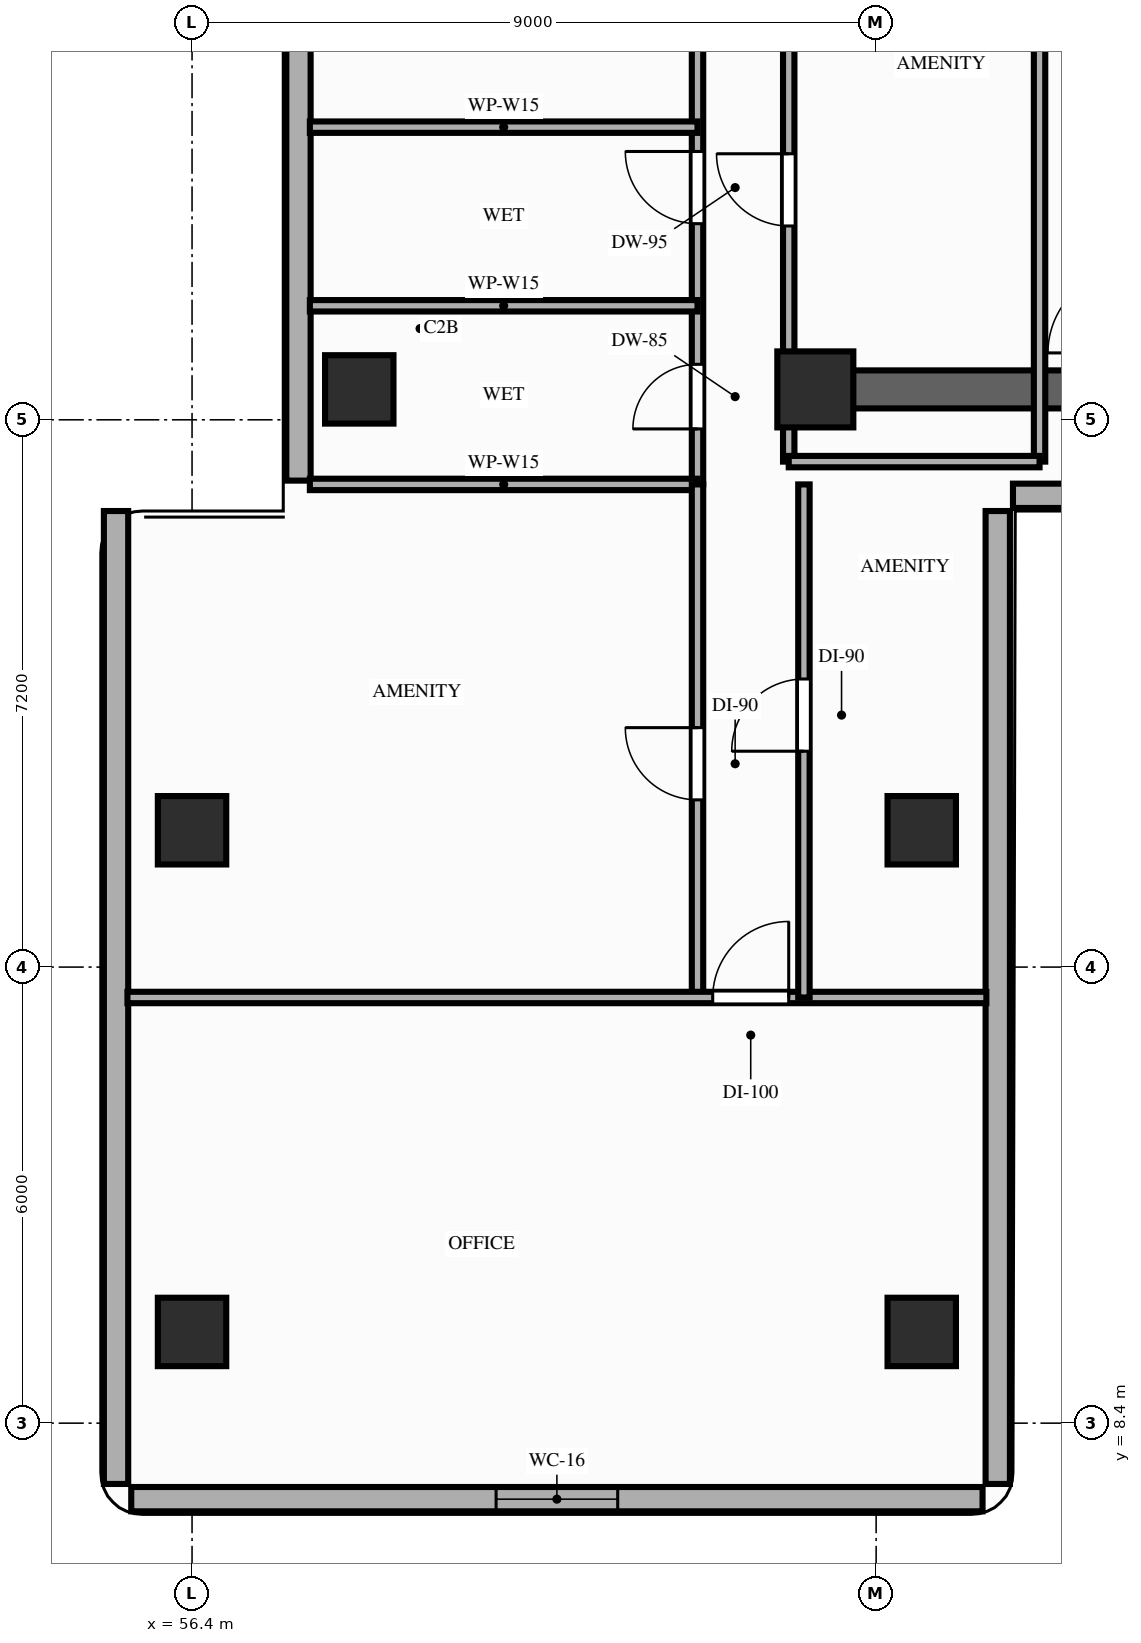
"""IFC4 building model, lengths in metres.
Left out: names, types, materials, properties, quantities, classifications, styles, units other than length and angle.
Written with IfcOpenShell. Run it as: python <this file> out.ifc"""

import sys

from ifc_helpers import new_model, si_unit, direction, frame, frame_2d, origin, origin_2d, place, context, subcontext, project, spatial, rectangle, extrude, element, fill, save


model = new_model("IFC4")
c1 = context("Model", 3, precision=1e-05, world=origin(), true_north=direction((0.0, 1.0)))
c2 = subcontext(c1, "Body", "Model", "MODEL_VIEW")
j1 = project(units=[si_unit("LENGTHUNIT", "METRE"), si_unit("PLANEANGLEUNIT", "RADIAN")], contexts=[c1])
p1 = place(None, origin())
s1 = spatial("IfcSite", under=j1, at=p1, CompositionType="ELEMENT")
p2 = place(p1, origin())
s2 = spatial("IfcBuilding", under=s1, at=p2, CompositionType="ELEMENT")
p3 = place(p2, frame((0.0, 0.0, 62.8)))
s3 = spatial("IfcBuildingStorey", under=s2, at=p3, CompositionType="ELEMENT", Elevation=62.8)
p4 = place(p3, frame((64.6, 22.0, 0.0), z_axis=(0.0, 0.0, 1.0), x_axis=(1.0, 0.0, 0.0)))
e1 = element("IfcColumn", 1, at=p4, inside=s3, PredefinedType="COLUMN", context=c2, shape_type="SweptSolid", body=[
    extrude(rectangle(XDim=1.0, YDim=1.0, at=origin_2d()), origin(), (0.0, 0.0, 1.0), 3.2),
])
for number, where, z_axis, x_axis in (
    (2, (58.6, 22.0, 0.0), (0.0, 0.0, 1.0), (1.0, 0.0, 0.0)),
    (3, (56.4, 9.6, 0.0), (0.0, 0.0, 1.0), (1.0, 0.0, 0.0)),
    (4, (56.4, 16.2, 0.0), (0.0, 0.0, 1.0), (1.0, 0.0, 0.0)),
    (5, (66.0, 9.6, 0.0), (0.0, 0.0, 1.0), (1.0, 0.0, 0.0)),
    (6, (66.0, 16.2, 0.0), (0.0, 0.0, 1.0), (1.0, 0.0, 0.0)),
):
    element("IfcColumn", number, at=place(p3, frame(where, z_axis=z_axis, x_axis=x_axis)), inside=s3, PredefinedType="COLUMN", context=c2, shape_type="SweptSolid", body=[
        extrude(rectangle(XDim=0.9, YDim=0.9, at=origin_2d()), origin(), (0.0, 0.0, 1.0), 3.2),
    ])
p5 = place(p3, frame((57.8, 43.4, 0.0), z_axis=(0.0, 0.0, 1.0), x_axis=(0.0, -1.0, 0.0)))
e7 = element("IfcWall", 7, at=p5, inside=s3, PredefinedType="STANDARD", context=c2, shape_type="SweptSolid", body=[
    extrude(rectangle(XDim=22.6, YDim=0.32, at=frame_2d((11.3, 0.0))), origin(), (0.0, 0.0, 1.0), 2.5),
])
p6 = place(p5, frame((3.6, 0.0, 0.85)))
e8 = element("IfcOpeningElement", 8, at=p6, cuts=e7, PredefinedType="OPENING", context=c2, shape_type="SweptSolid", body=[
    extrude(rectangle(XDim=1.6, YDim=1.35, at=frame_2d((0.8, 0.675))), frame((0.0, 0.17, 0.0), z_axis=(0.0, -1.0, 0.0), x_axis=(1.0, 0.0, 0.0)), (0.0, 0.0, 1.0), 0.34),
])
p7 = place(p3, frame((55.6, 7.4, 0.0), z_axis=(0.0, 0.0, 1.0), x_axis=(1.0, 0.0, 0.0)))
e9 = element("IfcWall", 9, at=p7, inside=s3, PredefinedType="STANDARD", context=c2, shape_type="SweptSolid", body=[
    extrude(rectangle(XDim=11.2, YDim=0.32, at=frame_2d((5.6, 0.0))), origin(), (0.0, 0.0, 1.0), 3.02),
])
p8 = place(p7, frame((4.8, 0.0, 0.85)))
e10 = element("IfcOpeningElement", 10, at=p8, cuts=e9, PredefinedType="OPENING", context=c2, shape_type="SweptSolid", body=[
    extrude(rectangle(XDim=1.6, YDim=1.7, at=frame_2d((0.8, 0.85))), frame((0.0, 0.17, 0.0), z_axis=(0.0, -1.0, 0.0), x_axis=(1.0, 0.0, 0.0)), (0.0, 0.0, 1.0), 0.34),
])
for number, where, z_axis, x_axis in (
    (11, (55.4, 20.4, 0.0), (0.0, 0.0, 1.0), (0.0, -1.0, 0.0)),
    (12, (67.0, 7.6, 0.0), (0.0, 0.0, 1.0), (0.0, 1.0, 0.0)),
):
    element("IfcWall", number, at=place(p3, frame(where, z_axis=z_axis, x_axis=x_axis)), inside=s3, PredefinedType="STANDARD", context=c2, shape_type="SweptSolid", body=[
        extrude(rectangle(XDim=12.8, YDim=0.32, at=frame_2d((6.4, 0.0))), origin(), (0.0, 0.0, 1.0), 3.02),
    ])
p9 = place(p3, frame((67.2, 20.6, 0.0), z_axis=(0.0, 0.0, 1.0), x_axis=(1.0, 0.0, 0.0)))
e13 = element("IfcWall", 13, at=p9, inside=s3, PredefinedType="STANDARD", context=c2, shape_type="SweptSolid", body=[
    extrude(rectangle(XDim=5.6, YDim=0.32, at=frame_2d((2.8, 0.0))), origin(), (0.0, 0.0, 1.0), 3.02),
])
p10 = place(p3, frame((64.6, 22.0, 0.0), z_axis=(0.0, 0.0, 1.0), x_axis=(1.0, 0.0, 0.0)))
e14 = element("IfcWall", 14, at=p10, inside=s3, PredefinedType="SHEAR", context=c2, shape_type="SweptSolid", body=[
    extrude(rectangle(XDim=7.5, YDim=0.5, at=frame_2d((3.75, 0.0))), origin(), (0.0, 0.0, 1.0), 3.02),
])
p11 = place(p3, frame((64.25, 21.05, 0.0), z_axis=(0.0, 0.0, 1.0), x_axis=(0.0, 1.0, 0.0)))
e15 = element("IfcWall", 15, at=p11, inside=s3, PredefinedType="PARTITIONING", context=c2, shape_type="SweptSolid", body=[
    extrude(rectangle(XDim=6.55, YDim=0.15, at=frame_2d((3.275, 0.0))), origin(), (0.0, 0.0, 1.0), 2.5),
])
p12 = place(p11, frame((3.1, 0.0, 0.0)))
e16 = element("IfcOpeningElement", 16, at=p12, cuts=e15, PredefinedType="OPENING", context=c2, shape_type="SweptSolid", body=[
    extrude(rectangle(XDim=0.95, YDim=2.15, at=frame_2d((0.475, 1.075))), frame((0.0, 0.085, 0.0), z_axis=(0.0, -1.0, 0.0), x_axis=(1.0, 0.0, 0.0)), (0.0, 0.0, 1.0), 0.17),
])
p13 = place(p3, frame((67.55, 21.05, 0.0), z_axis=(0.0, 0.0, 1.0), x_axis=(0.0, 1.0, 0.0)))
e17 = element("IfcWall", 17, at=p13, inside=s3, PredefinedType="PARTITIONING", context=c2, shape_type="SweptSolid", body=[
    extrude(rectangle(XDim=6.47, YDim=0.15, at=frame_2d((3.235, 0.0))), origin(), (0.0, 0.0, 1.0), 2.5),
])
p14 = place(p3, frame((64.25, 21.05, 0.0), z_axis=(0.0, 0.0, 1.0), x_axis=(1.0, 0.0, 0.0)))
e18 = element("IfcWall", 18, at=p14, inside=s3, PredefinedType="PARTITIONING", context=c2, shape_type="SweptSolid", body=[
    extrude(rectangle(XDim=3.3, YDim=0.15, at=frame_2d((1.65, 0.0))), origin(), (0.0, 0.0, 1.0), 2.5),
])
p15 = place(p3, frame((63.05, 20.75, 0.0), z_axis=(0.0, 0.0, 1.0), x_axis=(0.0, 1.0, 0.0)))
e19 = element("IfcWall", 19, at=p15, inside=s3, PredefinedType="PARTITIONING", context=c2, shape_type="SweptSolid", body=[
    extrude(rectangle(XDim=22.7, YDim=0.15, at=frame_2d((11.35, 0.0))), origin(), (0.0, 0.0, 1.0), 2.5),
])
p16 = place(p15, frame((0.73, 0.0, 0.0)))
e20 = element("IfcOpeningElement", 20, at=p16, cuts=e19, PredefinedType="OPENING", context=c2, shape_type="SweptSolid", body=[
    extrude(rectangle(XDim=0.85, YDim=2.1, at=frame_2d((0.425, 1.05))), frame((0.0, 0.085, 0.0), z_axis=(0.0, -1.0, 0.0), x_axis=(1.0, 0.0, 0.0)), (0.0, 0.0, 1.0), 0.17),
])
p17 = place(p15, frame((3.43, 0.0, 0.0)))
e21 = element("IfcOpeningElement", 21, at=p17, cuts=e19, PredefinedType="OPENING", context=c2, shape_type="SweptSolid", body=[
    extrude(rectangle(XDim=0.95, YDim=2.1, at=frame_2d((0.475, 1.05))), frame((0.0, 0.085, 0.0), z_axis=(0.0, -1.0, 0.0), x_axis=(1.0, 0.0, 0.0)), (0.0, 0.0, 1.0), 0.17),
])
p18 = place(p15, frame((8.15, 0.0, 0.0)))
e22 = element("IfcOpeningElement", 22, at=p18, cuts=e19, PredefinedType="OPENING", context=c2, shape_type="SweptSolid", body=[
    extrude(rectangle(XDim=0.95, YDim=2.15, at=frame_2d((0.475, 1.075))), frame((0.0, 0.085, 0.0), z_axis=(0.0, -1.0, 0.0), x_axis=(1.0, 0.0, 0.0)), (0.0, 0.0, 1.0), 0.17),
])
for number, where, z_axis, x_axis in (
    (23, (57.95, 20.75, 0.0), (0.0, 0.0, 1.0), (1.0, 0.0, 0.0)),
    (24, (57.95, 23.1, 0.0), (0.0, 0.0, 1.0), (1.0, 0.0, 0.0)),
    (25, (57.95, 25.45, 0.0), (0.0, 0.0, 1.0), (1.0, 0.0, 0.0)),
):
    element("IfcWall", number, at=place(p3, frame(where, z_axis=z_axis, x_axis=x_axis)), inside=s3, PredefinedType="PARTITIONING", context=c2, shape_type="SweptSolid", body=[
        extrude(rectangle(XDim=5.1, YDim=0.15, at=frame_2d((2.55, 0.0))), origin(), (0.0, 0.0, 1.0), 2.5),
    ])
p19 = place(p3, frame((63.05, 14.0, 0.0), z_axis=(0.0, 0.0, 1.0), x_axis=(0.0, 1.0, 0.0)))
e26 = element("IfcWall", 26, at=p19, inside=s3, PredefinedType="PARTITIONING", context=c2, shape_type="SweptSolid", body=[
    extrude(rectangle(XDim=6.75, YDim=0.15, at=frame_2d((3.375, 0.0))), origin(), (0.0, 0.0, 1.0), 2.5),
])
p20 = place(p19, frame((2.6, 0.0, 0.0)))
e27 = element("IfcOpeningElement", 27, at=p20, cuts=e26, PredefinedType="OPENING", context=c2, shape_type="SweptSolid", body=[
    extrude(rectangle(XDim=0.95, YDim=2.15, at=frame_2d((0.475, 1.075))), frame((0.0, 0.085, 0.0), z_axis=(0.0, -1.0, 0.0), x_axis=(1.0, 0.0, 0.0)), (0.0, 0.0, 1.0), 0.17),
])
p21 = place(p3, frame((55.55, 14.0, 0.0), z_axis=(0.0, 0.0, 1.0), x_axis=(1.0, 0.0, 0.0)))
e28 = element("IfcWall", 28, at=p21, inside=s3, PredefinedType="PARTITIONING", context=c2, shape_type="SweptSolid", body=[
    extrude(rectangle(XDim=11.3, YDim=0.15, at=frame_2d((5.65, 0.0))), origin(), (0.0, 0.0, 1.0), 2.5),
])
p22 = place(p21, frame((7.7, 0.0, 0.0)))
e29 = element("IfcOpeningElement", 29, at=p22, cuts=e28, PredefinedType="OPENING", context=c2, shape_type="SweptSolid", body=[
    extrude(rectangle(XDim=1.0, YDim=2.15, at=frame_2d((0.5, 1.075))), frame((0.0, 0.085, 0.0), z_axis=(0.0, -1.0, 0.0), x_axis=(1.0, 0.0, 0.0)), (0.0, 0.0, 1.0), 0.17),
])
p23 = place(p3, frame((64.45, 14.0, 0.0), z_axis=(0.0, 0.0, 1.0), x_axis=(0.0, 1.0, 0.0)))
e30 = element("IfcWall", 30, at=p23, inside=s3, PredefinedType="PARTITIONING", context=c2, shape_type="SweptSolid", body=[
    extrude(rectangle(XDim=6.75, YDim=0.15, at=frame_2d((3.375, 0.0))), origin(), (0.0, 0.0, 1.0), 2.5),
])
p24 = place(p23, frame((3.24, 0.0, 0.0)))
e31 = element("IfcOpeningElement", 31, at=p24, cuts=e30, PredefinedType="OPENING", context=c2, shape_type="SweptSolid", body=[
    extrude(rectangle(XDim=0.95, YDim=2.15, at=frame_2d((0.475, 1.075))), frame((0.0, 0.085, 0.0), z_axis=(0.0, -1.0, 0.0), x_axis=(1.0, 0.0, 0.0)), (0.0, 0.0, 1.0), 0.17),
])
p25 = place(p8, origin())
e32 = element("IfcWindow", 32, at=p25, inside=s3, PartitioningType="SINGLE_PANEL", PredefinedType="WINDOW", context=c2, shape_type="SweptSolid", body=[
    extrude(rectangle(XDim=1.6, YDim=1.7, at=frame_2d((0.8, 0.85))), frame((0.0, 0.03, 0.0), z_axis=(0.0, -1.0, 0.0), x_axis=(1.0, 0.0, 0.0)), (0.0, 0.0, 1.0), 0.06),
])
fill(e10, e32)
p26 = place(p12, origin())
e33 = element("IfcDoor", 33, at=p26, inside=s3, OperationType="SINGLE_SWING_RIGHT", PredefinedType="DOOR", context=c2, shape_type="SweptSolid", body=[
    extrude(rectangle(XDim=0.95, YDim=2.15, at=frame_2d((0.475, 1.075))), frame((0.0, 0.025, 0.0), z_axis=(0.0, -1.0, 0.0), x_axis=(1.0, 0.0, 0.0)), (0.0, 0.0, 1.0), 0.05),
])
fill(e16, e33)
p27 = place(p16, origin())
e34 = element("IfcDoor", 34, at=p27, inside=s3, OperationType="SINGLE_SWING_LEFT", PredefinedType="DOOR", context=c2, shape_type="SweptSolid", body=[
    extrude(rectangle(XDim=0.85, YDim=2.1, at=frame_2d((0.425, 1.05))), frame((0.0, 0.025, 0.0), z_axis=(0.0, -1.0, 0.0), x_axis=(1.0, 0.0, 0.0)), (0.0, 0.0, 1.0), 0.05),
])
fill(e20, e34)
p28 = place(p17, origin())
e35 = element("IfcDoor", 35, at=p28, inside=s3, OperationType="SINGLE_SWING_RIGHT", PredefinedType="DOOR", context=c2, shape_type="SweptSolid", body=[
    extrude(rectangle(XDim=0.95, YDim=2.1, at=frame_2d((0.475, 1.05))), frame((0.0, 0.025, 0.0), z_axis=(0.0, -1.0, 0.0), x_axis=(1.0, 0.0, 0.0)), (0.0, 0.0, 1.0), 0.05),
])
fill(e21, e35)
p29 = place(p20, origin())
e36 = element("IfcDoor", 36, at=p29, inside=s3, OperationType="SINGLE_SWING_RIGHT", PredefinedType="DOOR", context=c2, shape_type="SweptSolid", body=[
    extrude(rectangle(XDim=0.95, YDim=2.15, at=frame_2d((0.475, 1.075))), frame((0.0, 0.025, 0.0), z_axis=(0.0, -1.0, 0.0), x_axis=(1.0, 0.0, 0.0)), (0.0, 0.0, 1.0), 0.05),
])
fill(e27, e36)
p30 = place(p24, origin())
e37 = element("IfcDoor", 37, at=p30, inside=s3, OperationType="SINGLE_SWING_LEFT", PredefinedType="DOOR", context=c2, shape_type="SweptSolid", body=[
    extrude(rectangle(XDim=0.95, YDim=2.15, at=frame_2d((0.475, 1.075))), frame((0.0, 0.025, 0.0), z_axis=(0.0, -1.0, 0.0), x_axis=(1.0, 0.0, 0.0)), (0.0, 0.0, 1.0), 0.05),
])
fill(e31, e37)
p31 = place(p22, origin())
e38 = element("IfcDoor", 38, at=p31, inside=s3, OperationType="SINGLE_SWING_RIGHT", PredefinedType="DOOR", context=c2, shape_type="SweptSolid", body=[
    extrude(rectangle(XDim=1.0, YDim=2.15, at=frame_2d((0.5, 1.075))), frame((0.0, 0.025, 0.0), z_axis=(0.0, -1.0, 0.0), x_axis=(1.0, 0.0, 0.0)), (0.0, 0.0, 1.0), 0.05),
])
fill(e29, e38)
save(model, sys.argv[1])
